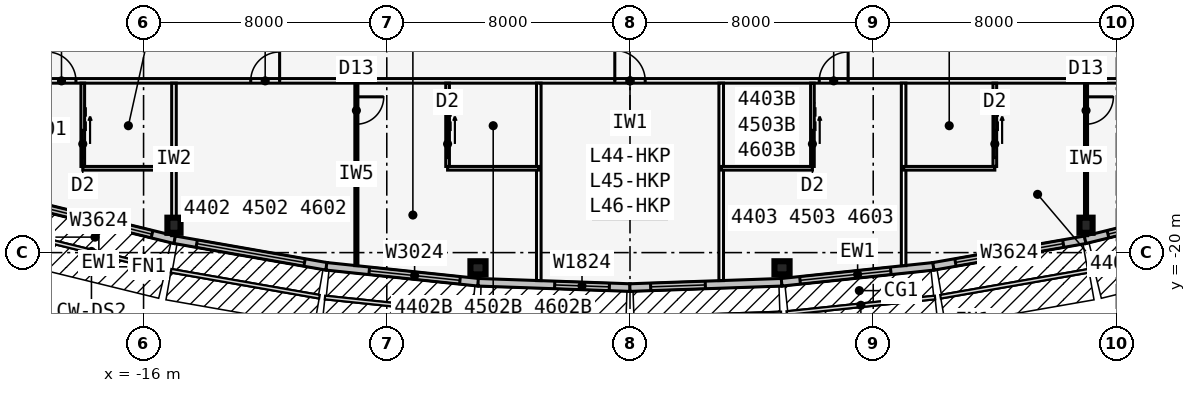
"""IFC4 building model, lengths in metres.
Left out: names, types, materials, properties, quantities, classifications, styles, units other than length and angle.
Written with IfcOpenShell. Run it as: python <this file> out.ifc"""

import sys

from ifc_helpers import new_model, si_unit, direction, frame, frame_2d, origin, origin_2d, place, context, subcontext, project, spatial, rectangle, i_section, extrude, element, fill, save


model = new_model("IFC4")
c1 = context("Model", 3, precision=1e-05, world=origin(), true_north=direction((0.0, 1.0)))
c2 = subcontext(c1, "Body", "Model", "MODEL_VIEW")
j1 = project(units=[si_unit("LENGTHUNIT", "METRE"), si_unit("PLANEANGLEUNIT", "RADIAN")], contexts=[c1])
p1 = place(None, origin())
s1 = spatial("IfcSite", under=j1, at=p1, CompositionType="ELEMENT")
p2 = place(p1, origin())
s2 = spatial("IfcBuilding", under=s1, at=p2, CompositionType="ELEMENT")
p3 = place(p2, frame((0.0, 0.0, 165.7)))
s3 = spatial("IfcBuildingStorey", under=s2, at=p3, CompositionType="ELEMENT", Elevation=165.7)
for number, where, z_axis, x_axis in (
    (1, (-15.0, -19.1, 0.0), (0.0, 0.0, 1.0), (1.0, 0.0, 0.0)),
    (2, (-5.0, -20.5, 0.0), (0.0, 0.0, 1.0), (0.0, -1.0, 0.0)),
    (3, (5.0, -20.5, 0.0), (0.0, 0.0, 1.0), (0.0, -1.0, 0.0)),
    (4, (15.0, -19.1, 0.0), (0.0, 0.0, 1.0), (1.0, 0.0, 0.0)),
):
    element("IfcColumn", number, at=place(p3, frame(where, z_axis=z_axis, x_axis=x_axis)), inside=s3, PredefinedType="COLUMN", context=c2, shape_type="SweptSolid", body=[
        extrude(i_section(OverallWidth=0.432, OverallDepth=0.498, WebThickness=0.056, FlangeThickness=0.089, at=origin_2d()), origin(), (0.0, 0.0, 1.0), 3.4),
    ])
p4 = place(p3, frame((0.0, -17.68, 0.0), z_axis=(0.0, 0.0, 1.0), x_axis=(0.0, -1.0, 0.0)))
e5 = element("IfcColumn", 5, at=p4, inside=s3, PredefinedType="COLUMN", context=c2, shape_type="SweptSolid", body=[
    extrude(rectangle(XDim=2.3, YDim=2.3, at=origin_2d()), origin(), (0.0, 0.0, 1.0), 3.4),
])
p5 = place(p3, frame((-19.97, -18.354, 0.0), z_axis=(0.0, 0.0, 1.0), x_axis=(0.971270024053, -0.237980126011, 0.0)))
e6 = element("IfcWall", 6, at=p5, inside=s3, PredefinedType="STANDARD", context=c2, shape_type="SweptSolid", body=[
    extrude(rectangle(XDim=5.148, YDim=0.25, at=frame_2d((2.574, 0.0))), origin(), (0.0, 0.0, 1.0), 3.235),
])
p6 = place(p5, frame((0.774, 0.0, 0.45)))
e7 = element("IfcOpeningElement", 7, at=p6, cuts=e6, PredefinedType="OPENING", context=c2, shape_type="SweptSolid", body=[
    extrude(rectangle(XDim=3.6, YDim=2.4, at=frame_2d((1.8, 1.2))), frame((0.0, 0.135, 0.0), z_axis=(0.0, -1.0, 0.0), x_axis=(1.0, 0.0, 0.0)), (0.0, 0.0, 1.0), 0.27),
])
p7 = place(p3, frame((-14.979, -19.577, 0.0), z_axis=(0.0, 0.0, 1.0), x_axis=(0.985030467156, -0.172380331752, 0.0)))
e8 = element("IfcWall", 8, at=p7, inside=s3, PredefinedType="STANDARD", context=c2, shape_type="SweptSolid", body=[
    extrude(rectangle(XDim=5.076, YDim=0.25, at=frame_2d((2.538, 0.0))), origin(), (0.0, 0.0, 1.0), 3.235),
])
p8 = place(p7, frame((0.738, 0.0, 0.45)))
e9 = element("IfcOpeningElement", 9, at=p8, cuts=e8, PredefinedType="OPENING", context=c2, shape_type="SweptSolid", body=[
    extrude(rectangle(XDim=3.6, YDim=2.4, at=frame_2d((1.8, 1.2))), frame((0.0, 0.135, 0.0), z_axis=(0.0, -1.0, 0.0), x_axis=(1.0, 0.0, 0.0)), (0.0, 0.0, 1.0), 0.27),
])
p9 = place(p3, frame((-9.987, -20.451, 0.0), z_axis=(0.0, 0.0, 1.0), x_axis=(0.994534683851, -0.104406717299, 0.0)))
e10 = element("IfcWall", 10, at=p9, inside=s3, PredefinedType="STANDARD", context=c2, shape_type="SweptSolid", body=[
    extrude(rectangle(XDim=5.028, YDim=0.25, at=frame_2d((2.514, 0.0))), origin(), (0.0, 0.0, 1.0), 3.235),
])
p10 = place(p9, frame((1.418, 0.0, 0.45)))
e11 = element("IfcOpeningElement", 11, at=p10, cuts=e10, PredefinedType="OPENING", context=c2, shape_type="SweptSolid", body=[
    extrude(rectangle(XDim=3.0, YDim=2.4, at=frame_2d((1.5, 1.2))), frame((0.0, 0.135, 0.0), z_axis=(0.0, -1.0, 0.0), x_axis=(1.0, 0.0, 0.0)), (0.0, 0.0, 1.0), 0.27),
])
p11 = place(p3, frame((-4.996, -20.975, 0.0), z_axis=(0.0, 0.0, 1.0), x_axis=(0.999387720943, -0.034988329879, 0.0)))
e12 = element("IfcWall", 12, at=p11, inside=s3, PredefinedType="STANDARD", context=c2, shape_type="SweptSolid", body=[
    extrude(rectangle(XDim=5.003, YDim=0.25, at=frame_2d((2.501, 0.0))), origin(), (0.0, 0.0, 1.0), 3.235),
])
p12 = place(p11, frame((2.519, 0.0, 0.45)))
e13 = element("IfcOpeningElement", 13, at=p12, cuts=e12, PredefinedType="OPENING", context=c2, shape_type="SweptSolid", body=[
    extrude(rectangle(XDim=1.8, YDim=2.4, at=frame_2d((0.9, 1.2))), frame((0.0, 0.135, 0.0), z_axis=(0.0, -1.0, 0.0), x_axis=(1.0, 0.0, 0.0)), (0.0, 0.0, 1.0), 0.27),
])
p13 = place(p3, frame((-0.004, -21.15, 0.0), z_axis=(0.0, 0.0, 1.0), x_axis=(0.999387720943, 0.034988329879, 0.0)))
e14 = element("IfcWall", 14, at=p13, inside=s3, PredefinedType="STANDARD", context=c2, shape_type="SweptSolid", body=[
    extrude(rectangle(XDim=5.003, YDim=0.25, at=frame_2d((2.501, 0.0))), origin(), (0.0, 0.0, 1.0), 3.235),
])
p14 = place(p13, frame((0.684, 0.0, 0.45)))
e15 = element("IfcOpeningElement", 15, at=p14, cuts=e14, PredefinedType="OPENING", context=c2, shape_type="SweptSolid", body=[
    extrude(rectangle(XDim=1.8, YDim=2.4, at=frame_2d((0.9, 1.2))), frame((0.0, 0.135, 0.0), z_axis=(0.0, -1.0, 0.0), x_axis=(1.0, 0.0, 0.0)), (0.0, 0.0, 1.0), 0.27),
])
p15 = place(p3, frame((4.987, -20.976, 0.0), z_axis=(0.0, 0.0, 1.0), x_axis=(0.994534683851, 0.104406717299, 0.0)))
e16 = element("IfcWall", 16, at=p15, inside=s3, PredefinedType="STANDARD", context=c2, shape_type="SweptSolid", body=[
    extrude(rectangle(XDim=5.028, YDim=0.25, at=frame_2d((2.514, 0.0))), origin(), (0.0, 0.0, 1.0), 3.235),
])
p16 = place(p15, frame((0.61, 0.0, 0.45)))
e17 = element("IfcOpeningElement", 17, at=p16, cuts=e16, PredefinedType="OPENING", context=c2, shape_type="SweptSolid", body=[
    extrude(rectangle(XDim=3.0, YDim=2.4, at=frame_2d((1.5, 1.2))), frame((0.0, 0.135, 0.0), z_axis=(0.0, -1.0, 0.0), x_axis=(1.0, 0.0, 0.0)), (0.0, 0.0, 1.0), 0.27),
])
p17 = place(p3, frame((9.979, -20.452, 0.0), z_axis=(0.0, 0.0, 1.0), x_axis=(0.985030467156, 0.172380331752, 0.0)))
e18 = element("IfcWall", 18, at=p17, inside=s3, PredefinedType="STANDARD", context=c2, shape_type="SweptSolid", body=[
    extrude(rectangle(XDim=5.076, YDim=0.25, at=frame_2d((2.538, 0.0))), origin(), (0.0, 0.0, 1.0), 3.235),
])
p18 = place(p17, frame((0.738, 0.0, 0.45)))
e19 = element("IfcOpeningElement", 19, at=p18, cuts=e18, PredefinedType="OPENING", context=c2, shape_type="SweptSolid", body=[
    extrude(rectangle(XDim=3.6, YDim=2.4, at=frame_2d((1.8, 1.2))), frame((0.0, 0.135, 0.0), z_axis=(0.0, -1.0, 0.0), x_axis=(1.0, 0.0, 0.0)), (0.0, 0.0, 1.0), 0.27),
])
p19 = place(p3, frame((14.97, -19.579, 0.0), z_axis=(0.0, 0.0, 1.0), x_axis=(0.971270024053, 0.237980126011, 0.0)))
e20 = element("IfcWall", 20, at=p19, inside=s3, PredefinedType="STANDARD", context=c2, shape_type="SweptSolid", body=[
    extrude(rectangle(XDim=5.148, YDim=0.25, at=frame_2d((2.574, 0.0))), origin(), (0.0, 0.0, 1.0), 3.235),
])
p20 = place(p19, frame((0.774, 0.0, 0.45)))
e21 = element("IfcOpeningElement", 21, at=p20, cuts=e20, PredefinedType="OPENING", context=c2, shape_type="SweptSolid", body=[
    extrude(rectangle(XDim=3.6, YDim=2.4, at=frame_2d((1.8, 1.2))), frame((0.0, 0.135, 0.0), z_axis=(0.0, -1.0, 0.0), x_axis=(1.0, 0.0, 0.0)), (0.0, 0.0, 1.0), 0.27),
])
p21 = place(p3, frame((-23.857, -14.351, 0.0), z_axis=(0.0, 0.0, 1.0), x_axis=(1.0, 0.0, 0.0)))
e22 = element("IfcWall", 22, at=p21, inside=s3, PredefinedType="PARTITIONING", context=c2, shape_type="SweptSolid", body=[
    extrude(rectangle(XDim=47.714, YDim=0.15, at=frame_2d((23.857, 0.0))), origin(), (0.0, 0.0, 1.0), 3.235),
])
p22 = place(p21, frame((4.682, 0.0, 0.0)))
e23 = element("IfcOpeningElement", 23, at=p22, cuts=e22, PredefinedType="OPENING", context=c2, shape_type="SweptSolid", body=[
    extrude(rectangle(XDim=0.95, YDim=2.13, at=frame_2d((0.475, 1.065))), frame((0.0, 0.085, 0.0), z_axis=(0.0, -1.0, 0.0), x_axis=(1.0, 0.0, 0.0)), (0.0, 0.0, 1.0), 0.17),
])
p23 = place(p21, frame((11.382, 0.0, 0.0)))
e24 = element("IfcOpeningElement", 24, at=p23, cuts=e22, PredefinedType="OPENING", context=c2, shape_type="SweptSolid", body=[
    extrude(rectangle(XDim=0.95, YDim=2.13, at=frame_2d((0.475, 1.065))), frame((0.0, 0.085, 0.0), z_axis=(0.0, -1.0, 0.0), x_axis=(1.0, 0.0, 0.0)), (0.0, 0.0, 1.0), 0.17),
])
p24 = place(p21, frame((23.357, 0.0, 0.0)))
e25 = element("IfcOpeningElement", 25, at=p24, cuts=e22, PredefinedType="OPENING", context=c2, shape_type="SweptSolid", body=[
    extrude(rectangle(XDim=1.0, YDim=2.13, at=frame_2d((0.5, 1.065))), frame((0.0, 0.085, 0.0), z_axis=(0.0, -1.0, 0.0), x_axis=(1.0, 0.0, 0.0)), (0.0, 0.0, 1.0), 0.17),
])
p25 = place(p21, frame((30.082, 0.0, 0.0)))
e26 = element("IfcOpeningElement", 26, at=p25, cuts=e22, PredefinedType="OPENING", context=c2, shape_type="SweptSolid", body=[
    extrude(rectangle(XDim=0.95, YDim=2.13, at=frame_2d((0.475, 1.065))), frame((0.0, 0.085, 0.0), z_axis=(0.0, -1.0, 0.0), x_axis=(1.0, 0.0, 0.0)), (0.0, 0.0, 1.0), 0.17),
])
p26 = place(p21, frame((43.041, 0.0, 0.0)))
e27 = element("IfcOpeningElement", 27, at=p26, cuts=e22, PredefinedType="OPENING", context=c2, shape_type="SweptSolid", body=[
    extrude(rectangle(XDim=0.95, YDim=2.13, at=frame_2d((0.475, 1.065))), frame((0.0, 0.085, 0.0), z_axis=(0.0, -1.0, 0.0), x_axis=(1.0, 0.0, 0.0)), (0.0, 0.0, 1.0), 0.17),
])
p27 = place(p3, frame((-15.0, -14.426, 0.0), z_axis=(0.0, 0.0, 1.0), x_axis=(0.0, -1.0, 0.0)))
e28 = element("IfcWall", 28, at=p27, inside=s3, PredefinedType="PARTITIONING", context=c2, shape_type="SweptSolid", body=[
    extrude(rectangle(XDim=5.017, YDim=0.15, at=frame_2d((2.508, 0.0))), origin(), (0.0, 0.0, 1.0), 2.389),
])
p28 = place(p3, frame((-9.0, -14.426, 0.0), z_axis=(0.0, 0.0, 1.0), x_axis=(0.0, -1.0, 0.0)))
e29 = element("IfcWall", 29, at=p28, inside=s3, PredefinedType="PARTITIONING", context=c2, shape_type="SweptSolid", body=[
    extrude(rectangle(XDim=6.002, YDim=0.1, at=frame_2d((3.001, 0.0))), origin(), (0.0, 0.0, 1.0), 3.235),
])
p29 = place(p28, frame((0.45, 0.0, 0.0)))
e30 = element("IfcOpeningElement", 30, at=p29, cuts=e29, PredefinedType="OPENING", context=c2, shape_type="SweptSolid", body=[
    extrude(rectangle(XDim=0.9, YDim=2.13, at=frame_2d((0.45, 1.065))), frame((0.0, 0.06, 0.0), z_axis=(0.0, -1.0, 0.0), x_axis=(1.0, 0.0, 0.0)), (0.0, 0.0, 1.0), 0.12),
])
for number, where, z_axis, x_axis in (
    (31, (-3.0, -14.426, 0.0), (0.0, 0.0, 1.0), (0.0, -1.0, 0.0)),
    (32, (3.0, -14.426, 0.0), (0.0, 0.0, 1.0), (0.0, -1.0, 0.0)),
):
    element("IfcWall", number, at=place(p3, frame(where, z_axis=z_axis, x_axis=x_axis)), inside=s3, PredefinedType="PARTITIONING", context=c2, shape_type="SweptSolid", body=[
        extrude(rectangle(XDim=6.494, YDim=0.15, at=frame_2d((3.247, 0.0))), origin(), (0.0, 0.0, 1.0), 3.235),
    ])
p30 = place(p3, frame((9.0, -14.426, 0.0), z_axis=(0.0, 0.0, 1.0), x_axis=(0.0, -1.0, 0.0)))
e33 = element("IfcWall", 33, at=p30, inside=s3, PredefinedType="PARTITIONING", context=c2, shape_type="SweptSolid", body=[
    extrude(rectangle(XDim=6.002, YDim=0.15, at=frame_2d((3.001, 0.0))), origin(), (0.0, 0.0, 1.0), 3.235),
])
p31 = place(p3, frame((15.0, -14.426, 0.0), z_axis=(0.0, 0.0, 1.0), x_axis=(0.0, -1.0, 0.0)))
e34 = element("IfcWall", 34, at=p31, inside=s3, PredefinedType="PARTITIONING", context=c2, shape_type="SweptSolid", body=[
    extrude(rectangle(XDim=5.017, YDim=0.1, at=frame_2d((2.508, 0.0))), origin(), (0.0, 0.0, 1.0), 2.389),
])
p32 = place(p31, frame((0.45, 0.0, 0.0)))
e35 = element("IfcOpeningElement", 35, at=p32, cuts=e34, PredefinedType="OPENING", context=c2, shape_type="SweptSolid", body=[
    extrude(rectangle(XDim=0.9, YDim=2.13, at=frame_2d((0.45, 1.065))), frame((0.0, 0.06, 0.0), z_axis=(0.0, -1.0, 0.0), x_axis=(1.0, 0.0, 0.0)), (0.0, 0.0, 1.0), 0.12),
])
p33 = place(p3, frame((-18.0, -17.226, 0.0), z_axis=(0.0, 0.0, 1.0), x_axis=(1.0, 0.0, 0.0)))
e36 = element("IfcWall", 36, at=p33, inside=s3, PredefinedType="PLUMBINGWALL", context=c2, shape_type="SweptSolid", body=[
    extrude(rectangle(XDim=3.0, YDim=0.12, at=frame_2d((1.5, 0.0))), origin(), (0.0, 0.0, 1.0), 3.235),
])
p34 = place(p3, frame((-18.0, -14.426, 0.0), z_axis=(0.0, 0.0, 1.0), x_axis=(0.0, -1.0, 0.0)))
e37 = element("IfcWall", 37, at=p34, inside=s3, PredefinedType="PLUMBINGWALL", context=c2, shape_type="SweptSolid", body=[
    extrude(rectangle(XDim=2.74, YDim=0.12, at=frame_2d((1.37, 0.0))), origin(), (0.0, 0.0, 1.0), 3.235),
])
p35 = place(p34, frame((1.55, 0.0, 0.0)))
e38 = element("IfcOpeningElement", 38, at=p35, cuts=e37, PredefinedType="OPENING", context=c2, shape_type="SweptSolid", body=[
    extrude(rectangle(XDim=0.9, YDim=2.13, at=frame_2d((0.45, 1.065))), frame((0.0, 0.07, 0.0), z_axis=(0.0, -1.0, 0.0), x_axis=(1.0, 0.0, 0.0)), (0.0, 0.0, 1.0), 0.14),
])
p36 = place(p3, frame((-6.0, -17.226, 0.0), z_axis=(0.0, 0.0, 1.0), x_axis=(1.0, 0.0, 0.0)))
e39 = element("IfcWall", 39, at=p36, inside=s3, PredefinedType="PLUMBINGWALL", context=c2, shape_type="SweptSolid", body=[
    extrude(rectangle(XDim=3.0, YDim=0.12, at=frame_2d((1.5, 0.0))), origin(), (0.0, 0.0, 1.0), 3.235),
])
p37 = place(p3, frame((-6.0, -14.426, 0.0), z_axis=(0.0, 0.0, 1.0), x_axis=(0.0, -1.0, 0.0)))
e40 = element("IfcWall", 40, at=p37, inside=s3, PredefinedType="PLUMBINGWALL", context=c2, shape_type="SweptSolid", body=[
    extrude(rectangle(XDim=2.74, YDim=0.12, at=frame_2d((1.37, 0.0))), origin(), (0.0, 0.0, 1.0), 3.235),
])
p38 = place(p37, frame((1.55, 0.0, 0.0)))
e41 = element("IfcOpeningElement", 41, at=p38, cuts=e40, PredefinedType="OPENING", context=c2, shape_type="SweptSolid", body=[
    extrude(rectangle(XDim=0.9, YDim=2.13, at=frame_2d((0.45, 1.065))), frame((0.0, 0.07, 0.0), z_axis=(0.0, -1.0, 0.0), x_axis=(1.0, 0.0, 0.0)), (0.0, 0.0, 1.0), 0.14),
])
p39 = place(p3, frame((3.0, -17.226, 0.0), z_axis=(0.0, 0.0, 1.0), x_axis=(1.0, 0.0, 0.0)))
e42 = element("IfcWall", 42, at=p39, inside=s3, PredefinedType="PLUMBINGWALL", context=c2, shape_type="SweptSolid", body=[
    extrude(rectangle(XDim=3.0, YDim=0.12, at=frame_2d((1.5, 0.0))), origin(), (0.0, 0.0, 1.0), 3.235),
])
p40 = place(p3, frame((6.0, -14.426, 0.0), z_axis=(0.0, 0.0, 1.0), x_axis=(0.0, -1.0, 0.0)))
e43 = element("IfcWall", 43, at=p40, inside=s3, PredefinedType="PLUMBINGWALL", context=c2, shape_type="SweptSolid", body=[
    extrude(rectangle(XDim=2.74, YDim=0.12, at=frame_2d((1.37, 0.0))), origin(), (0.0, 0.0, 1.0), 3.235),
])
p41 = place(p40, frame((1.55, 0.0, 0.0)))
e44 = element("IfcOpeningElement", 44, at=p41, cuts=e43, PredefinedType="OPENING", context=c2, shape_type="SweptSolid", body=[
    extrude(rectangle(XDim=0.9, YDim=2.13, at=frame_2d((0.45, 1.065))), frame((0.0, 0.07, 0.0), z_axis=(0.0, -1.0, 0.0), x_axis=(1.0, 0.0, 0.0)), (0.0, 0.0, 1.0), 0.14),
])
p42 = place(p3, frame((9.0, -17.226, 0.0), z_axis=(0.0, 0.0, 1.0), x_axis=(1.0, 0.0, 0.0)))
e45 = element("IfcWall", 45, at=p42, inside=s3, PredefinedType="PLUMBINGWALL", context=c2, shape_type="SweptSolid", body=[
    extrude(rectangle(XDim=3.0, YDim=0.12, at=frame_2d((1.5, 0.0))), origin(), (0.0, 0.0, 1.0), 3.235),
])
p43 = place(p3, frame((12.0, -14.426, 0.0), z_axis=(0.0, 0.0, 1.0), x_axis=(0.0, -1.0, 0.0)))
e46 = element("IfcWall", 46, at=p43, inside=s3, PredefinedType="PLUMBINGWALL", context=c2, shape_type="SweptSolid", body=[
    extrude(rectangle(XDim=2.74, YDim=0.12, at=frame_2d((1.37, 0.0))), origin(), (0.0, 0.0, 1.0), 3.235),
])
p44 = place(p43, frame((1.55, 0.0, 0.0)))
e47 = element("IfcOpeningElement", 47, at=p44, cuts=e46, PredefinedType="OPENING", context=c2, shape_type="SweptSolid", body=[
    extrude(rectangle(XDim=0.9, YDim=2.13, at=frame_2d((0.45, 1.065))), frame((0.0, 0.07, 0.0), z_axis=(0.0, -1.0, 0.0), x_axis=(1.0, 0.0, 0.0)), (0.0, 0.0, 1.0), 0.14),
])
p45 = place(p6, origin())
e48 = element("IfcWindow", 48, at=p45, inside=s3, PartitioningType="SINGLE_PANEL", PredefinedType="WINDOW", context=c2, shape_type="SweptSolid", body=[
    extrude(rectangle(XDim=3.6, YDim=2.4, at=frame_2d((1.8, 1.2))), frame((0.0, 0.03, 0.0), z_axis=(0.0, -1.0, 0.0), x_axis=(1.0, 0.0, 0.0)), (0.0, 0.0, 1.0), 0.06),
])
fill(e7, e48)
p46 = place(p8, origin())
e49 = element("IfcWindow", 49, at=p46, inside=s3, PartitioningType="SINGLE_PANEL", PredefinedType="WINDOW", context=c2, shape_type="SweptSolid", body=[
    extrude(rectangle(XDim=3.6, YDim=2.4, at=frame_2d((1.8, 1.2))), frame((0.0, 0.03, 0.0), z_axis=(0.0, -1.0, 0.0), x_axis=(1.0, 0.0, 0.0)), (0.0, 0.0, 1.0), 0.06),
])
fill(e9, e49)
p47 = place(p10, origin())
e50 = element("IfcWindow", 50, at=p47, inside=s3, PartitioningType="SINGLE_PANEL", PredefinedType="WINDOW", context=c2, shape_type="SweptSolid", body=[
    extrude(rectangle(XDim=3.0, YDim=2.4, at=frame_2d((1.5, 1.2))), frame((0.0, 0.03, 0.0), z_axis=(0.0, -1.0, 0.0), x_axis=(1.0, 0.0, 0.0)), (0.0, 0.0, 1.0), 0.06),
])
fill(e11, e50)
p48 = place(p12, origin())
e51 = element("IfcWindow", 51, at=p48, inside=s3, PartitioningType="SINGLE_PANEL", PredefinedType="WINDOW", context=c2, shape_type="SweptSolid", body=[
    extrude(rectangle(XDim=1.8, YDim=2.4, at=frame_2d((0.9, 1.2))), frame((0.0, 0.03, 0.0), z_axis=(0.0, -1.0, 0.0), x_axis=(1.0, 0.0, 0.0)), (0.0, 0.0, 1.0), 0.06),
])
fill(e13, e51)
p49 = place(p14, origin())
e52 = element("IfcWindow", 52, at=p49, inside=s3, PartitioningType="SINGLE_PANEL", PredefinedType="WINDOW", context=c2, shape_type="SweptSolid", body=[
    extrude(rectangle(XDim=1.8, YDim=2.4, at=frame_2d((0.9, 1.2))), frame((0.0, 0.03, 0.0), z_axis=(0.0, -1.0, 0.0), x_axis=(1.0, 0.0, 0.0)), (0.0, 0.0, 1.0), 0.06),
])
fill(e15, e52)
p50 = place(p16, origin())
e53 = element("IfcWindow", 53, at=p50, inside=s3, PartitioningType="SINGLE_PANEL", PredefinedType="WINDOW", context=c2, shape_type="SweptSolid", body=[
    extrude(rectangle(XDim=3.0, YDim=2.4, at=frame_2d((1.5, 1.2))), frame((0.0, 0.03, 0.0), z_axis=(0.0, -1.0, 0.0), x_axis=(1.0, 0.0, 0.0)), (0.0, 0.0, 1.0), 0.06),
])
fill(e17, e53)
p51 = place(p18, origin())
e54 = element("IfcWindow", 54, at=p51, inside=s3, PartitioningType="SINGLE_PANEL", PredefinedType="WINDOW", context=c2, shape_type="SweptSolid", body=[
    extrude(rectangle(XDim=3.6, YDim=2.4, at=frame_2d((1.8, 1.2))), frame((0.0, 0.03, 0.0), z_axis=(0.0, -1.0, 0.0), x_axis=(1.0, 0.0, 0.0)), (0.0, 0.0, 1.0), 0.06),
])
fill(e19, e54)
p52 = place(p20, origin())
e55 = element("IfcWindow", 55, at=p52, inside=s3, PartitioningType="SINGLE_PANEL", PredefinedType="WINDOW", context=c2, shape_type="SweptSolid", body=[
    extrude(rectangle(XDim=3.6, YDim=2.4, at=frame_2d((1.8, 1.2))), frame((0.0, 0.03, 0.0), z_axis=(0.0, -1.0, 0.0), x_axis=(1.0, 0.0, 0.0)), (0.0, 0.0, 1.0), 0.06),
])
fill(e21, e55)
p53 = place(p29, origin())
e56 = element("IfcDoor", 56, at=p53, inside=s3, OperationType="SINGLE_SWING_LEFT", PredefinedType="DOOR", context=c2, shape_type="SweptSolid", body=[
    extrude(rectangle(XDim=0.9, YDim=2.13, at=frame_2d((0.45, 1.065))), frame((0.0, 0.025, 0.0), z_axis=(0.0, -1.0, 0.0), x_axis=(1.0, 0.0, 0.0)), (0.0, 0.0, 1.0), 0.05),
])
fill(e30, e56)
p54 = place(p32, origin())
e57 = element("IfcDoor", 57, at=p54, inside=s3, OperationType="SINGLE_SWING_LEFT", PredefinedType="DOOR", context=c2, shape_type="SweptSolid", body=[
    extrude(rectangle(XDim=0.9, YDim=2.13, at=frame_2d((0.45, 1.065))), frame((0.0, 0.025, 0.0), z_axis=(0.0, -1.0, 0.0), x_axis=(1.0, 0.0, 0.0)), (0.0, 0.0, 1.0), 0.05),
])
fill(e35, e57)
p55 = place(p35, origin())
e58 = element("IfcDoor", 58, at=p55, inside=s3, OperationType="SLIDING_TO_LEFT", PredefinedType="DOOR", context=c2, shape_type="SweptSolid", body=[
    extrude(rectangle(XDim=0.9, YDim=2.13, at=frame_2d((0.45, 1.065))), frame((0.0, 0.025, 0.0), z_axis=(0.0, -1.0, 0.0), x_axis=(1.0, 0.0, 0.0)), (0.0, 0.0, 1.0), 0.05),
])
fill(e38, e58)
p56 = place(p22, origin())
e59 = element("IfcDoor", 59, at=p56, inside=s3, OperationType="SINGLE_SWING_LEFT", PredefinedType="DOOR", context=c2, shape_type="SweptSolid", body=[
    extrude(rectangle(XDim=0.95, YDim=2.13, at=frame_2d((0.475, 1.065))), frame((0.0, 0.025, 0.0), z_axis=(0.0, -1.0, 0.0), x_axis=(1.0, 0.0, 0.0)), (0.0, 0.0, 1.0), 0.05),
])
fill(e23, e59)
p57 = place(p23, origin())
e60 = element("IfcDoor", 60, at=p57, inside=s3, OperationType="SINGLE_SWING_RIGHT", PredefinedType="DOOR", context=c2, shape_type="SweptSolid", body=[
    extrude(rectangle(XDim=0.95, YDim=2.13, at=frame_2d((0.475, 1.065))), frame((0.0, 0.025, 0.0), z_axis=(0.0, -1.0, 0.0), x_axis=(1.0, 0.0, 0.0)), (0.0, 0.0, 1.0), 0.05),
])
fill(e24, e60)
p58 = place(p38, origin())
e61 = element("IfcDoor", 61, at=p58, inside=s3, OperationType="SLIDING_TO_LEFT", PredefinedType="DOOR", context=c2, shape_type="SweptSolid", body=[
    extrude(rectangle(XDim=0.9, YDim=2.13, at=frame_2d((0.45, 1.065))), frame((0.0, 0.025, 0.0), z_axis=(0.0, -1.0, 0.0), x_axis=(1.0, 0.0, 0.0)), (0.0, 0.0, 1.0), 0.05),
])
fill(e41, e61)
p59 = place(p24, origin())
e62 = element("IfcDoor", 62, at=p59, inside=s3, OperationType="SINGLE_SWING_LEFT", PredefinedType="DOOR", context=c2, shape_type="SweptSolid", body=[
    extrude(rectangle(XDim=1.0, YDim=2.13, at=frame_2d((0.5, 1.065))), frame((0.0, 0.025, 0.0), z_axis=(0.0, -1.0, 0.0), x_axis=(1.0, 0.0, 0.0)), (0.0, 0.0, 1.0), 0.05),
])
fill(e25, e62)
p60 = place(p41, origin())
e63 = element("IfcDoor", 63, at=p60, inside=s3, OperationType="SLIDING_TO_LEFT", PredefinedType="DOOR", context=c2, shape_type="SweptSolid", body=[
    extrude(rectangle(XDim=0.9, YDim=2.13, at=frame_2d((0.45, 1.065))), frame((0.0, 0.025, 0.0), z_axis=(0.0, -1.0, 0.0), x_axis=(1.0, 0.0, 0.0)), (0.0, 0.0, 1.0), 0.05),
])
fill(e44, e63)
p61 = place(p25, origin())
e64 = element("IfcDoor", 64, at=p61, inside=s3, OperationType="SINGLE_SWING_RIGHT", PredefinedType="DOOR", context=c2, shape_type="SweptSolid", body=[
    extrude(rectangle(XDim=0.95, YDim=2.13, at=frame_2d((0.475, 1.065))), frame((0.0, 0.025, 0.0), z_axis=(0.0, -1.0, 0.0), x_axis=(1.0, 0.0, 0.0)), (0.0, 0.0, 1.0), 0.05),
])
fill(e26, e64)
p62 = place(p44, origin())
e65 = element("IfcDoor", 65, at=p62, inside=s3, OperationType="SLIDING_TO_LEFT", PredefinedType="DOOR", context=c2, shape_type="SweptSolid", body=[
    extrude(rectangle(XDim=0.9, YDim=2.13, at=frame_2d((0.45, 1.065))), frame((0.0, 0.025, 0.0), z_axis=(0.0, -1.0, 0.0), x_axis=(1.0, 0.0, 0.0)), (0.0, 0.0, 1.0), 0.05),
])
fill(e47, e65)
save(model, sys.argv[1])
